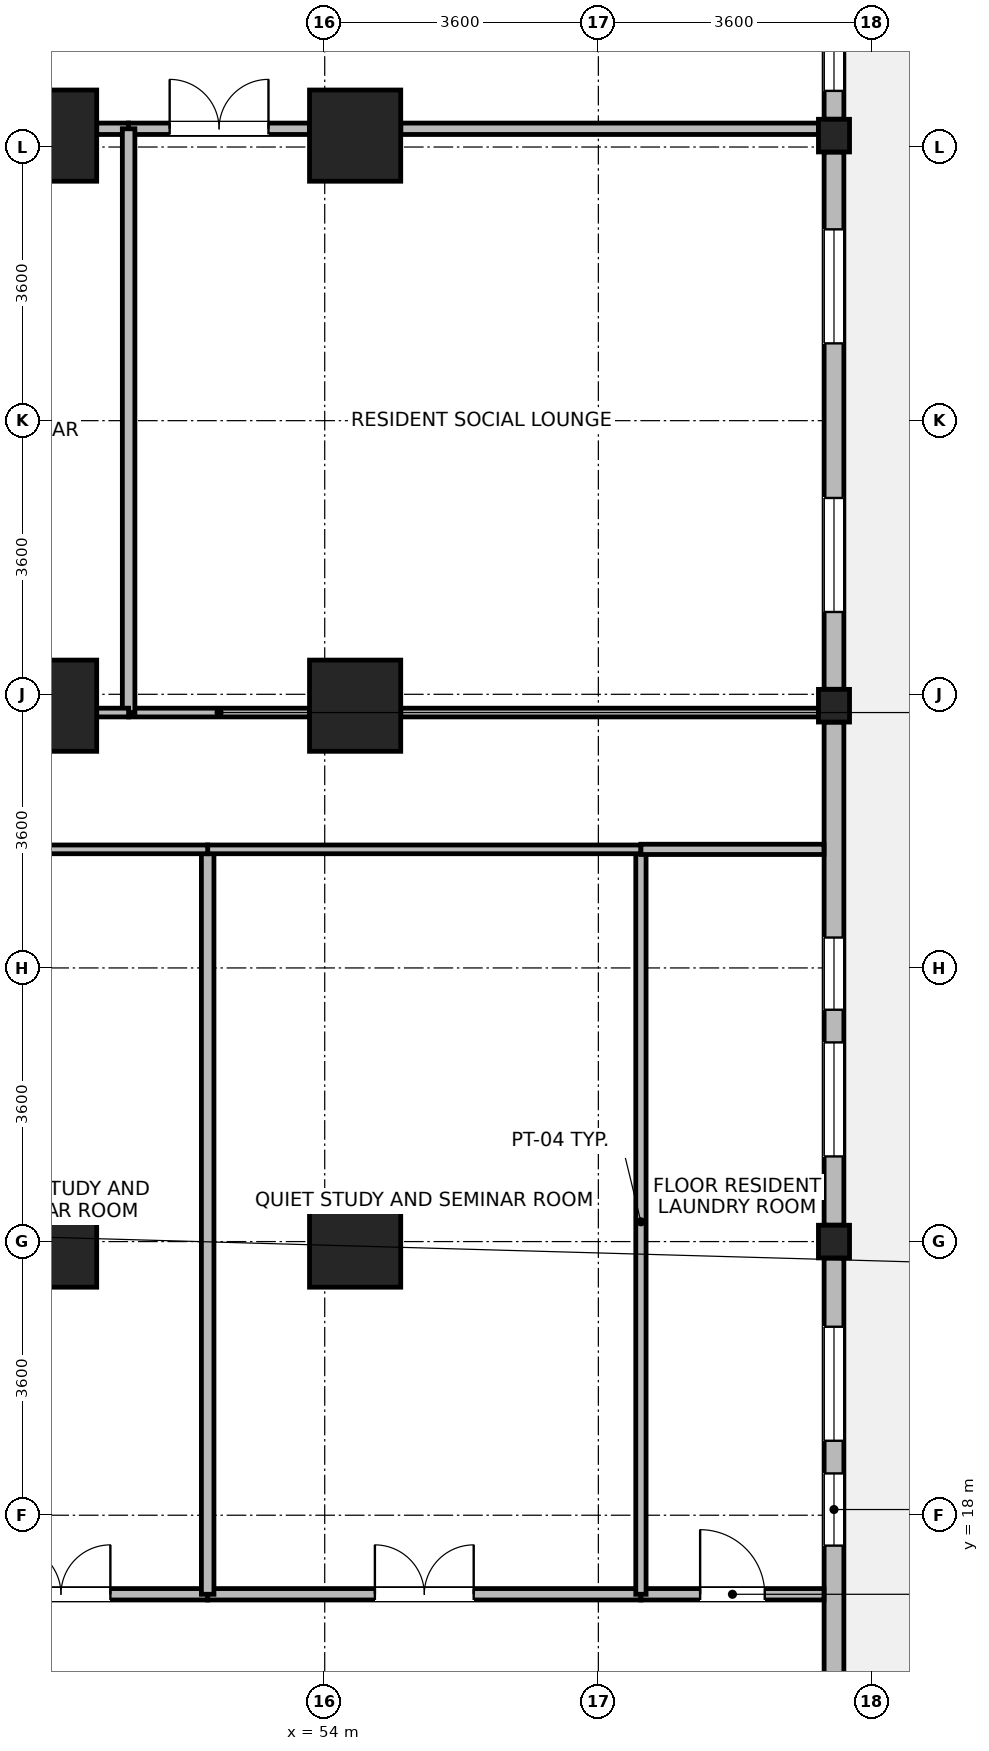
"""IFC4 building model, lengths in metres.
Left out: names, types, materials, properties, quantities, classifications, styles, units other than length and angle.
Written with IfcOpenShell. Run it as: python <this file> out.ifc"""

import sys

from ifc_helpers import new_model, si_unit, direction, frame, frame_2d, origin, origin_2d, place, context, subcontext, project, spatial, rectangle, i_section, extrude, source, transform, mapped, element, fill, save


model = new_model("IFC4")
c1 = context("Model", 3, precision=1e-05, world=origin(), true_north=direction((0.0, 1.0)))
c2 = subcontext(c1, "Body", "Model", "MODEL_VIEW")
j1 = project(units=[si_unit("LENGTHUNIT", "METRE"), si_unit("PLANEANGLEUNIT", "RADIAN")], contexts=[c1])
p1 = place(None, origin())
s1 = spatial("IfcSite", under=j1, at=p1, CompositionType="ELEMENT")
p2 = place(p1, origin())
s2 = spatial("IfcBuilding", under=s1, at=p2, CompositionType="ELEMENT")
p3 = place(p2, frame((0.0, 0.0, 115.6)))
s3 = spatial("IfcBuildingStorey", under=s2, at=p3, CompositionType="ELEMENT", Elevation=115.6)
m1 = source(origin(), c2, "Body", "SweptSolid", [
    extrude(rectangle(XDim=1.2, YDim=1.2, at=origin_2d()), origin(), (0.0, 0.0, 1.0), 3.7),
])
for number, where, z_axis, x_axis in (
    (1, (50.4, 21.6, 0.0), (0.0, 0.0, 1.0), (1.0, 0.0, 0.0)),
    (2, (50.4, 28.65, 0.0), (0.0, 0.0, 1.0), (1.0, 0.0, 0.0)),
    (3, (50.4, 36.15, 0.0), (0.0, 0.0, 1.0), (1.0, 0.0, 0.0)),
    (4, (54.4, 21.6, 0.0), (0.0, 0.0, 1.0), (1.0, 0.0, 0.0)),
    (5, (54.4, 28.65, 0.0), (0.0, 0.0, 1.0), (1.0, 0.0, 0.0)),
    (6, (54.4, 36.15, 0.0), (0.0, 0.0, 1.0), (1.0, 0.0, 0.0)),
):
    element("IfcColumn", number, at=place(p3, frame(where, z_axis=z_axis, x_axis=x_axis)), inside=s3, PredefinedType="COLUMN", context=c2, shape_type="MappedRepresentation", body=[
        mapped(m1, transform((0.0, 0.0, 0.0), x_axis=(1.0, 0.0, 0.0), y_axis=(0.0, 1.0, 0.0), z_axis=(0.0, 0.0, 1.0), scale=1.0)),
    ])
m2 = source(origin(), c2, "Body", "SweptSolid", [
    extrude(i_section(OverallWidth=0.409, OverallDepth=0.43, WebThickness=0.024, FlangeThickness=0.033, FilletRadius=0.015, at=origin_2d()), origin(), (0.0, 0.0, 1.0), 3.7),
])
for number, where, z_axis, x_axis in (
    (7, (60.7, 21.6, 0.0), (0.0, 0.0, 1.0), (1.0, 0.0, 0.0)),
    (8, (60.7, 28.65, 0.0), (0.0, 0.0, 1.0), (1.0, 0.0, 0.0)),
    (9, (60.7, 36.15, 0.0), (0.0, 0.0, 1.0), (1.0, 0.0, 0.0)),
):
    element("IfcColumn", number, at=place(p3, frame(where, z_axis=z_axis, x_axis=x_axis)), inside=s3, PredefinedType="COLUMN", context=c2, shape_type="MappedRepresentation", body=[
        mapped(m2, transform((0.0, 0.0, 0.0), x_axis=(1.0, 0.0, 0.0), y_axis=(0.0, 1.0, 0.0), z_axis=(0.0, 0.0, 1.0), scale=1.0)),
    ])
p4 = place(p3, frame((60.7, 21.384, 0.0), z_axis=(0.0, 0.0, 1.0), x_axis=(0.0, -1.0, 0.0)))
e10 = element("IfcWall", 10, at=p4, inside=s3, PredefinedType="STANDARD", context=c2, shape_type="SweptSolid", body=[
    extrude(rectangle(XDim=6.618, YDim=0.26, at=frame_2d((3.309, 0.0))), origin(), (0.0, 0.0, 1.0), 2.98),
])
p5 = place(p4, frame((0.905, 0.0, 0.85)))
e11 = element("IfcOpeningElement", 11, at=p5, cuts=e10, PredefinedType="OPENING", context=c2, shape_type="SweptSolid", body=[
    extrude(rectangle(XDim=1.5, YDim=1.85, at=frame_2d((0.75, 0.925))), frame((0.0, 0.14, 0.0), z_axis=(0.0, -1.0, 0.0), x_axis=(1.0, 0.0, 0.0)), (0.0, 0.0, 1.0), 0.28),
])
p6 = place(p4, frame((2.834, 0.0, 0.85)))
e12 = element("IfcOpeningElement", 12, at=p6, cuts=e10, PredefinedType="OPENING", context=c2, shape_type="SweptSolid", body=[
    extrude(rectangle(XDim=0.95, YDim=1.75, at=frame_2d((0.475, 0.875))), frame((0.0, 0.14, 0.0), z_axis=(0.0, -1.0, 0.0), x_axis=(1.0, 0.0, 0.0)), (0.0, 0.0, 1.0), 0.28),
])
p7 = place(p3, frame((60.7, 28.434, 0.0), z_axis=(0.0, 0.0, 1.0), x_axis=(0.0, -1.0, 0.0)))
e13 = element("IfcWall", 13, at=p7, inside=s3, PredefinedType="STANDARD", context=c2, shape_type="SweptSolid", body=[
    extrude(rectangle(XDim=6.618, YDim=0.26, at=frame_2d((3.309, 0.0))), origin(), (0.0, 0.0, 1.0), 2.98),
])
p8 = place(p7, frame((4.213, 0.0, 0.85)))
e14 = element("IfcOpeningElement", 14, at=p8, cuts=e13, PredefinedType="OPENING", context=c2, shape_type="SweptSolid", body=[
    extrude(rectangle(XDim=1.5, YDim=1.85, at=frame_2d((0.75, 0.925))), frame((0.0, 0.14, 0.0), z_axis=(0.0, -1.0, 0.0), x_axis=(1.0, 0.0, 0.0)), (0.0, 0.0, 1.0), 0.28),
])
p9 = place(p7, frame((2.834, 0.0, 0.85)))
e15 = element("IfcOpeningElement", 15, at=p9, cuts=e13, PredefinedType="OPENING", context=c2, shape_type="SweptSolid", body=[
    extrude(rectangle(XDim=0.95, YDim=1.75, at=frame_2d((0.475, 0.875))), frame((0.0, 0.14, 0.0), z_axis=(0.0, -1.0, 0.0), x_axis=(1.0, 0.0, 0.0)), (0.0, 0.0, 1.0), 0.28),
])
p10 = place(p3, frame((60.7, 35.934, 0.0), z_axis=(0.0, 0.0, 1.0), x_axis=(0.0, -1.0, 0.0)))
e16 = element("IfcWall", 16, at=p10, inside=s3, PredefinedType="STANDARD", context=c2, shape_type="SweptSolid", body=[
    extrude(rectangle(XDim=7.068, YDim=0.26, at=frame_2d((3.534, 0.0))), origin(), (0.0, 0.0, 1.0), 2.98),
])
p11 = place(p10, frame((1.017, 0.0, 0.85)))
e17 = element("IfcOpeningElement", 17, at=p11, cuts=e16, PredefinedType="OPENING", context=c2, shape_type="SweptSolid", body=[
    extrude(rectangle(XDim=1.5, YDim=1.85, at=frame_2d((0.75, 0.925))), frame((0.0, 0.14, 0.0), z_axis=(0.0, -1.0, 0.0), x_axis=(1.0, 0.0, 0.0)), (0.0, 0.0, 1.0), 0.28),
])
p12 = place(p10, frame((4.551, 0.0, 0.85)))
e18 = element("IfcOpeningElement", 18, at=p12, cuts=e16, PredefinedType="OPENING", context=c2, shape_type="SweptSolid", body=[
    extrude(rectangle(XDim=1.5, YDim=1.85, at=frame_2d((0.75, 0.925))), frame((0.0, 0.14, 0.0), z_axis=(0.0, -1.0, 0.0), x_axis=(1.0, 0.0, 0.0)), (0.0, 0.0, 1.0), 0.28),
])
p13 = place(p3, frame((60.7, 39.73, 0.0), z_axis=(0.0, 0.0, 1.0), x_axis=(0.0, -1.0, 0.0)))
e19 = element("IfcWall", 19, at=p13, inside=s3, PredefinedType="STANDARD", context=c2, shape_type="SweptSolid", body=[
    extrude(rectangle(XDim=3.364, YDim=0.26, at=frame_2d((1.682, 0.0))), origin(), (0.0, 0.0, 1.0), 3.43),
])
p14 = place(p13, frame((2.041, 0.0, 0.85)))
e20 = element("IfcOpeningElement", 20, at=p14, cuts=e19, PredefinedType="OPENING", context=c2, shape_type="SweptSolid", body=[
    extrude(rectangle(XDim=0.95, YDim=1.75, at=frame_2d((0.475, 0.875))), frame((0.0, 0.14, 0.0), z_axis=(0.0, -1.0, 0.0), x_axis=(1.0, 0.0, 0.0)), (0.0, 0.0, 1.0), 0.28),
])
p15 = place(p13, frame((0.265, 0.0, 0.85)))
e21 = element("IfcOpeningElement", 21, at=p15, cuts=e19, PredefinedType="OPENING", context=c2, shape_type="SweptSolid", body=[
    extrude(rectangle(XDim=0.95, YDim=1.75, at=frame_2d((0.475, 0.875))), frame((0.0, 0.14, 0.0), z_axis=(0.0, -1.0, 0.0), x_axis=(1.0, 0.0, 0.0)), (0.0, 0.0, 1.0), 0.28),
])
p16 = place(p3, frame((51.42, 36.24, 0.0), z_axis=(0.0, 0.0, 1.0), x_axis=(1.0, 0.0, 0.0)))
e22 = element("IfcWall", 22, at=p16, inside=s3, PredefinedType="PARTITIONING", context=c2, shape_type="SweptSolid", body=[
    extrude(rectangle(XDim=2.38, YDim=0.15, at=frame_2d((1.19, 0.0))), origin(), (0.0, 0.0, 1.0), 2.78),
])
p17 = place(p16, frame((0.54, 0.0, 0.0)))
e23 = element("IfcOpeningElement", 23, at=p17, cuts=e22, PredefinedType="OPENING", context=c2, shape_type="SweptSolid", body=[
    extrude(rectangle(XDim=1.3, YDim=2.12, at=frame_2d((0.65, 1.06))), frame((0.0, 0.085, 0.0), z_axis=(0.0, -1.0, 0.0), x_axis=(1.0, 0.0, 0.0)), (0.0, 0.0, 1.0), 0.17),
])
p18 = place(p3, frame((55.0, 36.24, 0.0), z_axis=(0.0, 0.0, 1.0), x_axis=(1.0, 0.0, 0.0)))
e24 = element("IfcWall", 24, at=p18, inside=s3, PredefinedType="PARTITIONING", context=c2, shape_type="SweptSolid", body=[
    extrude(rectangle(XDim=5.496, YDim=0.15, at=frame_2d((2.748, 0.0))), origin(), (0.0, 0.0, 1.0), 2.78),
])
p19 = place(p3, frame((52.46, 16.96, 0.0), z_axis=(0.0, 0.0, 1.0), x_axis=(1.0, 0.0, 0.0)))
e25 = element("IfcWall", 25, at=p19, inside=s3, PredefinedType="PARTITIONING", context=c2, shape_type="SweptSolid", body=[
    extrude(rectangle(XDim=5.7, YDim=0.15, at=frame_2d((2.85, 0.0))), origin(), (0.0, 0.0, 1.0), 3.43),
])
p20 = place(p19, frame((2.2, 0.0, 0.0)))
e26 = element("IfcOpeningElement", 26, at=p20, cuts=e25, PredefinedType="OPENING", context=c2, shape_type="SweptSolid", body=[
    extrude(rectangle(XDim=1.3, YDim=2.12, at=frame_2d((0.65, 1.06))), frame((0.0, 0.085, 0.0), z_axis=(0.0, -1.0, 0.0), x_axis=(1.0, 0.0, 0.0)), (0.0, 0.0, 1.0), 0.17),
])
p21 = place(p3, frame((51.0, 36.24, 0.0), z_axis=(0.0, 0.0, 1.0), x_axis=(1.0, 0.0, 0.0)))
e27 = element("IfcWall", 27, at=p21, inside=s3, PredefinedType="PARTITIONING", context=c2, shape_type="SweptSolid", body=[
    extrude(rectangle(XDim=0.42, YDim=0.15, at=frame_2d((0.21, 0.0))), origin(), (0.0, 0.0, 1.0), 2.78),
])
p22 = place(p3, frame((48.6, 16.96, 0.0), z_axis=(0.0, 0.0, 1.0), x_axis=(1.0, 0.0, 0.0)))
e28 = element("IfcWall", 28, at=p22, inside=s3, PredefinedType="PARTITIONING", context=c2, shape_type="SweptSolid", body=[
    extrude(rectangle(XDim=3.86, YDim=0.15, at=frame_2d((1.93, 0.0))), origin(), (0.0, 0.0, 1.0), 3.43),
])
p23 = place(p22, frame((1.28, 0.0, 0.0)))
e29 = element("IfcOpeningElement", 29, at=p23, cuts=e28, PredefinedType="OPENING", context=c2, shape_type="SweptSolid", body=[
    extrude(rectangle(XDim=1.3, YDim=2.12, at=frame_2d((0.65, 1.06))), frame((0.0, 0.085, 0.0), z_axis=(0.0, -1.0, 0.0), x_axis=(1.0, 0.0, 0.0)), (0.0, 0.0, 1.0), 0.17),
])
p24 = place(p3, frame((58.16, 16.96, 0.0), z_axis=(0.0, 0.0, 1.0), x_axis=(1.0, 0.0, 0.0)))
e30 = element("IfcWall", 30, at=p24, inside=s3, PredefinedType="PARTITIONING", context=c2, shape_type="SweptSolid", body=[
    extrude(rectangle(XDim=2.408, YDim=0.15, at=frame_2d((1.204, 0.0))), origin(), (0.0, 0.0, 1.0), 3.43),
])
p25 = place(p24, frame((0.779, 0.0, 0.0)))
e31 = element("IfcOpeningElement", 31, at=p25, cuts=e30, PredefinedType="OPENING", context=c2, shape_type="SweptSolid", body=[
    extrude(rectangle(XDim=0.85, YDim=2.04, at=frame_2d((0.425, 1.02))), frame((0.0, 0.085, 0.0), z_axis=(0.0, -1.0, 0.0), x_axis=(1.0, 0.0, 0.0)), (0.0, 0.0, 1.0), 0.17),
])
p26 = place(p3, frame((52.46, 16.96, 0.0), z_axis=(0.0, 0.0, 1.0), x_axis=(0.0, 1.0, 0.0)))
e32 = element("IfcWall", 32, at=p26, inside=s3, PredefinedType="PARTITIONING", context=c2, shape_type="SweptSolid", body=[
    extrude(rectangle(XDim=9.8, YDim=0.165, at=frame_2d((4.9, 0.0))), origin(), (0.0, 0.0, 1.0), 3.43),
])
p27 = place(p3, frame((58.16, 16.96, 0.0), z_axis=(0.0, 0.0, 1.0), x_axis=(0.0, 1.0, 0.0)))
e33 = element("IfcWall", 33, at=p27, inside=s3, PredefinedType="PARTITIONING", context=c2, shape_type="SweptSolid", body=[
    extrude(rectangle(XDim=9.8, YDim=0.135, at=frame_2d((4.9, 0.0))), origin(), (0.0, 0.0, 1.0), 3.43),
])
p28 = place(p3, frame((51.42, 28.56, 0.0), z_axis=(0.0, 0.0, 1.0), x_axis=(1.0, 0.0, 0.0)))
e34 = element("IfcWall", 34, at=p28, inside=s3, PredefinedType="PARTITIONING", context=c2, shape_type="SweptSolid", body=[
    extrude(rectangle(XDim=2.38, YDim=0.115, at=frame_2d((1.19, 0.0))), origin(), (0.0, 0.0, 1.0), 2.78),
])
p29 = place(p3, frame((55.0, 28.56, 0.0), z_axis=(0.0, 0.0, 1.0), x_axis=(1.0, 0.0, 0.0)))
e35 = element("IfcWall", 35, at=p29, inside=s3, PredefinedType="PARTITIONING", context=c2, shape_type="SweptSolid", body=[
    extrude(rectangle(XDim=5.496, YDim=0.115, at=frame_2d((2.748, 0.0))), origin(), (0.0, 0.0, 1.0), 2.78),
])
p30 = place(p3, frame((51.42, 28.56, 0.0), z_axis=(0.0, 0.0, 1.0), x_axis=(0.0, 1.0, 0.0)))
e36 = element("IfcWall", 36, at=p30, inside=s3, PredefinedType="PARTITIONING", context=c2, shape_type="SweptSolid", body=[
    extrude(rectangle(XDim=7.68, YDim=0.165, at=frame_2d((3.84, 0.0))), origin(), (0.0, 0.0, 1.0), 3.43),
])
p31 = place(p3, frame((52.46, 26.76, 0.0), z_axis=(0.0, 0.0, 1.0), x_axis=(1.0, 0.0, 0.0)))
e37 = element("IfcWall", 37, at=p31, inside=s3, PredefinedType="PARTITIONING", context=c2, shape_type="SweptSolid", body=[
    extrude(rectangle(XDim=5.7, YDim=0.115, at=frame_2d((2.85, 0.0))), origin(), (0.0, 0.0, 1.0), 3.43),
])
p32 = place(p3, frame((51.0, 28.56, 0.0), z_axis=(0.0, 0.0, 1.0), x_axis=(1.0, 0.0, 0.0)))
e38 = element("IfcWall", 38, at=p32, inside=s3, PredefinedType="PARTITIONING", context=c2, shape_type="SweptSolid", body=[
    extrude(rectangle(XDim=0.42, YDim=0.115, at=frame_2d((0.21, 0.0))), origin(), (0.0, 0.0, 1.0), 2.78),
])
p33 = place(p3, frame((48.6, 26.76, 0.0), z_axis=(0.0, 0.0, 1.0), x_axis=(1.0, 0.0, 0.0)))
e39 = element("IfcWall", 39, at=p33, inside=s3, PredefinedType="PARTITIONING", context=c2, shape_type="SweptSolid", body=[
    extrude(rectangle(XDim=3.86, YDim=0.115, at=frame_2d((1.93, 0.0))), origin(), (0.0, 0.0, 1.0), 3.43),
])
p34 = place(p3, frame((58.16, 26.76, 0.0), z_axis=(0.0, 0.0, 1.0), x_axis=(1.0, 0.0, 0.0)))
e40 = element("IfcWall", 40, at=p34, inside=s3, PredefinedType="PARTITIONING", context=c2, shape_type="SweptSolid", body=[
    extrude(rectangle(XDim=2.408, YDim=0.135, at=frame_2d((1.204, 0.0))), origin(), (0.0, 0.0, 1.0), 3.43),
])
p35 = place(p5, origin())
e41 = element("IfcWindow", 41, at=p35, inside=s3, PartitioningType="SINGLE_PANEL", PredefinedType="WINDOW", context=c2, shape_type="SweptSolid", body=[
    extrude(rectangle(XDim=1.5, YDim=1.85, at=frame_2d((0.75, 0.925))), frame((0.0, 0.03, 0.0), z_axis=(0.0, -1.0, 0.0), x_axis=(1.0, 0.0, 0.0)), (0.0, 0.0, 1.0), 0.06),
])
fill(e11, e41)
p36 = place(p6, origin())
e42 = element("IfcWindow", 42, at=p36, inside=s3, PartitioningType="SINGLE_PANEL", PredefinedType="WINDOW", context=c2, shape_type="SweptSolid", body=[
    extrude(rectangle(XDim=0.95, YDim=1.75, at=frame_2d((0.475, 0.875))), frame((0.0, 0.03, 0.0), z_axis=(0.0, -1.0, 0.0), x_axis=(1.0, 0.0, 0.0)), (0.0, 0.0, 1.0), 0.06),
])
fill(e12, e42)
p37 = place(p8, origin())
e43 = element("IfcWindow", 43, at=p37, inside=s3, PartitioningType="SINGLE_PANEL", PredefinedType="WINDOW", context=c2, shape_type="SweptSolid", body=[
    extrude(rectangle(XDim=1.5, YDim=1.85, at=frame_2d((0.75, 0.925))), frame((0.0, 0.03, 0.0), z_axis=(0.0, -1.0, 0.0), x_axis=(1.0, 0.0, 0.0)), (0.0, 0.0, 1.0), 0.06),
])
fill(e14, e43)
p38 = place(p9, origin())
e44 = element("IfcWindow", 44, at=p38, inside=s3, PartitioningType="SINGLE_PANEL", PredefinedType="WINDOW", context=c2, shape_type="SweptSolid", body=[
    extrude(rectangle(XDim=0.95, YDim=1.75, at=frame_2d((0.475, 0.875))), frame((0.0, 0.03, 0.0), z_axis=(0.0, -1.0, 0.0), x_axis=(1.0, 0.0, 0.0)), (0.0, 0.0, 1.0), 0.06),
])
fill(e15, e44)
p39 = place(p11, origin())
e45 = element("IfcWindow", 45, at=p39, inside=s3, PartitioningType="SINGLE_PANEL", PredefinedType="WINDOW", context=c2, shape_type="SweptSolid", body=[
    extrude(rectangle(XDim=1.5, YDim=1.85, at=frame_2d((0.75, 0.925))), frame((0.0, 0.03, 0.0), z_axis=(0.0, -1.0, 0.0), x_axis=(1.0, 0.0, 0.0)), (0.0, 0.0, 1.0), 0.06),
])
fill(e17, e45)
p40 = place(p12, origin())
e46 = element("IfcWindow", 46, at=p40, inside=s3, PartitioningType="SINGLE_PANEL", PredefinedType="WINDOW", context=c2, shape_type="SweptSolid", body=[
    extrude(rectangle(XDim=1.5, YDim=1.85, at=frame_2d((0.75, 0.925))), frame((0.0, 0.03, 0.0), z_axis=(0.0, -1.0, 0.0), x_axis=(1.0, 0.0, 0.0)), (0.0, 0.0, 1.0), 0.06),
])
fill(e18, e46)
p41 = place(p14, origin())
e47 = element("IfcWindow", 47, at=p41, inside=s3, PartitioningType="SINGLE_PANEL", PredefinedType="WINDOW", context=c2, shape_type="SweptSolid", body=[
    extrude(rectangle(XDim=0.95, YDim=1.75, at=frame_2d((0.475, 0.875))), frame((0.0, 0.03, 0.0), z_axis=(0.0, -1.0, 0.0), x_axis=(1.0, 0.0, 0.0)), (0.0, 0.0, 1.0), 0.06),
])
fill(e20, e47)
p42 = place(p17, origin())
e48 = element("IfcDoor", 48, at=p42, inside=s3, OperationType="DOUBLE_DOOR_SINGLE_SWING", PredefinedType="DOOR", context=c2, shape_type="SweptSolid", body=[
    extrude(rectangle(XDim=1.3, YDim=2.12, at=frame_2d((0.65, 1.06))), frame((0.0, 0.025, 0.0), z_axis=(0.0, -1.0, 0.0), x_axis=(1.0, 0.0, 0.0)), (0.0, 0.0, 1.0), 0.05),
])
fill(e23, e48)
p43 = place(p20, origin())
e49 = element("IfcDoor", 49, at=p43, inside=s3, OperationType="DOUBLE_DOOR_SINGLE_SWING", PredefinedType="DOOR", context=c2, shape_type="SweptSolid", body=[
    extrude(rectangle(XDim=1.3, YDim=2.12, at=frame_2d((0.65, 1.06))), frame((0.0, 0.025, 0.0), z_axis=(0.0, -1.0, 0.0), x_axis=(1.0, 0.0, 0.0)), (0.0, 0.0, 1.0), 0.05),
])
fill(e26, e49)
p44 = place(p23, origin())
e50 = element("IfcDoor", 50, at=p44, inside=s3, OperationType="DOUBLE_DOOR_SINGLE_SWING", PredefinedType="DOOR", context=c2, shape_type="SweptSolid", body=[
    extrude(rectangle(XDim=1.3, YDim=2.12, at=frame_2d((0.65, 1.06))), frame((0.0, 0.025, 0.0), z_axis=(0.0, -1.0, 0.0), x_axis=(1.0, 0.0, 0.0)), (0.0, 0.0, 1.0), 0.05),
])
fill(e29, e50)
p45 = place(p25, origin())
e51 = element("IfcDoor", 51, at=p45, inside=s3, OperationType="SINGLE_SWING_LEFT", PredefinedType="DOOR", context=c2, shape_type="SweptSolid", body=[
    extrude(rectangle(XDim=0.85, YDim=2.04, at=frame_2d((0.425, 1.02))), frame((0.0, 0.025, 0.0), z_axis=(0.0, -1.0, 0.0), x_axis=(1.0, 0.0, 0.0)), (0.0, 0.0, 1.0), 0.05),
])
fill(e31, e51)
save(model, sys.argv[1])
